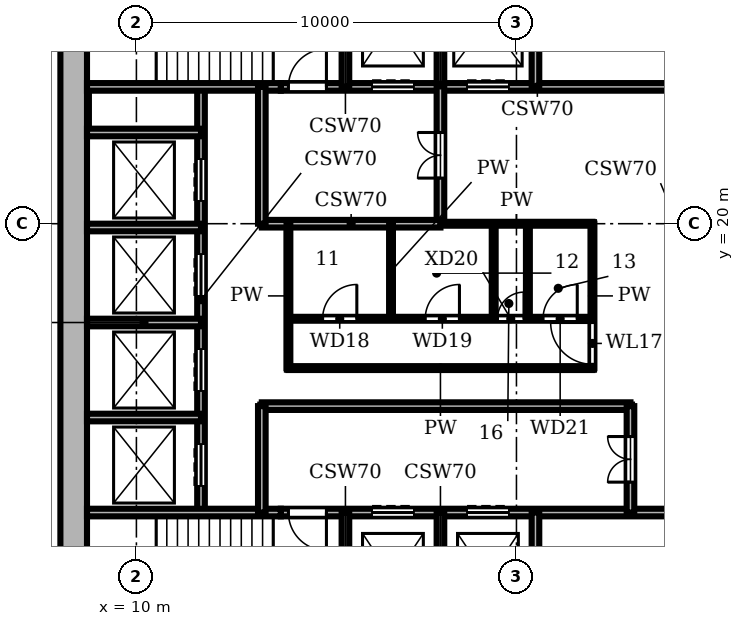
"""IFC4 building model, lengths in metres.
Left out: names, types, materials, properties, quantities, classifications, styles, units other than length and angle.
Written with IfcOpenShell. Run it as: python <this file> out.ifc"""

import sys

from ifc_helpers import new_model, si_unit, direction, frame, frame_2d, origin, place, context, subcontext, project, spatial, rectangle, extrude, element, fill, save


model = new_model("IFC4")
c1 = context("Model", 3, precision=1e-05, world=origin(), true_north=direction((0.0, 1.0)))
c2 = subcontext(c1, "Body", "Model", "MODEL_VIEW")
j1 = project(units=[si_unit("LENGTHUNIT", "METRE"), si_unit("PLANEANGLEUNIT", "RADIAN")], contexts=[c1])
p1 = place(None, origin())
s1 = spatial("IfcSite", under=j1, at=p1, CompositionType="ELEMENT")
p2 = place(p1, origin())
s2 = spatial("IfcBuilding", under=s1, at=p2, CompositionType="ELEMENT")
p3 = place(p2, frame((0.0, 0.0, 155.1)))
s3 = spatial("IfcBuildingStorey", under=s2, at=p3, CompositionType="ELEMENT", Elevation=155.1)
p4 = place(p3, frame((8.35, 27.3, 0.0), z_axis=(0.0, 0.0, 1.0), x_axis=(0.0, -1.0, 0.0)))
e1 = element("IfcWall", 1, at=p4, inside=s3, PredefinedType="SHEAR", context=c2, shape_type="SweptSolid", body=[
    extrude(rectangle(XDim=18.6, YDim=0.7, at=frame_2d((9.3, 0.0))), origin(), (0.0, 0.0, 1.0), 3.9),
])
p5 = place(p3, frame((8.7, 12.4, 0.0), z_axis=(0.0, 0.0, 1.0), x_axis=(1.0, 0.0, 0.0)))
e2 = element("IfcWall", 2, at=p5, inside=s3, PredefinedType="SHEAR", context=c2, shape_type="SweptSolid", body=[
    extrude(rectangle(XDim=5.1, YDim=0.2, at=frame_2d((2.55, 0.0))), origin(), (0.0, 0.0, 1.0), 3.58),
])
p6 = place(p3, frame((13.8, 12.4, 0.0), z_axis=(0.0, 0.0, 1.0), x_axis=(1.0, 0.0, 0.0)))
e3 = element("IfcWall", 3, at=p6, inside=s3, PredefinedType="SHEAR", context=c2, shape_type="SweptSolid", body=[
    extrude(rectangle(XDim=13.5, YDim=0.2, at=frame_2d((6.75, 0.0))), origin(), (0.0, 0.0, 1.0), 3.58),
])
p7 = place(p6, frame((2.4, 0.0, 0.0)))
e4 = element("IfcOpeningElement", 4, at=p7, cuts=e3, PredefinedType="OPENING", context=c2, shape_type="SweptSolid", body=[
    extrude(rectangle(XDim=1.1, YDim=2.1, at=frame_2d((0.55, 1.05))), frame((0.0, 0.11, 0.0), z_axis=(0.0, -1.0, 0.0), x_axis=(1.0, 0.0, 0.0)), (0.0, 0.0, 1.0), 0.22),
])
p8 = place(p6, frame((4.9, 0.0, 0.0)))
e5 = element("IfcOpeningElement", 5, at=p8, cuts=e3, PredefinedType="OPENING", context=c2, shape_type="SweptSolid", body=[
    extrude(rectangle(XDim=1.1, YDim=2.1, at=frame_2d((0.55, 1.05))), frame((0.0, 0.11, 0.0), z_axis=(0.0, -1.0, 0.0), x_axis=(1.0, 0.0, 0.0)), (0.0, 0.0, 1.0), 0.22),
])
p9 = place(p6, frame((0.2, 0.0, 0.0)))
e6 = element("IfcOpeningElement", 6, at=p9, cuts=e3, PredefinedType="OPENING", context=c2, shape_type="SweptSolid", body=[
    extrude(rectangle(XDim=1.0, YDim=2.1, at=frame_2d((0.5, 1.05))), frame((0.0, 0.11, 0.0), z_axis=(0.0, -1.0, 0.0), x_axis=(1.0, 0.0, 0.0)), (0.0, 0.0, 1.0), 0.22),
])
p10 = place(p3, frame((8.7, 14.9, 0.0), z_axis=(0.0, 0.0, 1.0), x_axis=(1.0, 0.0, 0.0)))
e7 = element("IfcWall", 7, at=p10, inside=s3, PredefinedType="SHEAR", context=c2, shape_type="SweptSolid", body=[
    extrude(rectangle(XDim=3.0, YDim=0.2, at=frame_2d((1.5, 0.0))), origin(), (0.0, 0.0, 1.0), 3.58),
])
p11 = place(p3, frame((13.3, 15.2, 0.0), z_axis=(0.0, 0.0, 1.0), x_axis=(1.0, 0.0, 0.0)))
e8 = element("IfcWall", 8, at=p11, inside=s3, PredefinedType="SHEAR", context=c2, shape_type="SweptSolid", body=[
    extrude(rectangle(XDim=9.7, YDim=0.2, at=frame_2d((4.85, 0.0))), origin(), (0.0, 0.0, 1.0), 3.58),
])
p12 = place(p3, frame((14.0, 16.2, 0.0), z_axis=(0.0, 0.0, 1.0), x_axis=(1.0, 0.0, 0.0)))
e9 = element("IfcWall", 9, at=p12, inside=s3, PredefinedType="PARTITIONING", context=c2, shape_type="SweptSolid", body=[
    extrude(rectangle(XDim=8.0, YDim=0.1, at=frame_2d((4.0, 0.0))), origin(), (0.0, 0.0, 1.0), 3.58),
])
p13 = place(p3, frame((8.7, 17.4, 0.0), z_axis=(0.0, 0.0, 1.0), x_axis=(1.0, 0.0, 0.0)))
e10 = element("IfcWall", 10, at=p13, inside=s3, PredefinedType="SHEAR", context=c2, shape_type="SweptSolid", body=[
    extrude(rectangle(XDim=3.0, YDim=0.2, at=frame_2d((1.5, 0.0))), origin(), (0.0, 0.0, 1.0), 3.58),
])
p14 = place(p3, frame((14.0, 17.5, 0.0), z_axis=(0.0, 0.0, 1.0), x_axis=(1.0, 0.0, 0.0)))
e11 = element("IfcWall", 11, at=p14, inside=s3, PredefinedType="PARTITIONING", context=c2, shape_type="SweptSolid", body=[
    extrude(rectangle(XDim=8.0, YDim=0.1, at=frame_2d((4.0, 0.0))), origin(), (0.0, 0.0, 1.0), 3.58),
])
p15 = place(p14, frame((0.9, 0.0, 0.0)))
e12 = element("IfcOpeningElement", 12, at=p15, cuts=e11, PredefinedType="OPENING", context=c2, shape_type="SweptSolid", body=[
    extrude(rectangle(XDim=0.9, YDim=2.1, at=frame_2d((0.45, 1.05))), frame((0.0, 0.06, 0.0), z_axis=(0.0, -1.0, 0.0), x_axis=(1.0, 0.0, 0.0)), (0.0, 0.0, 1.0), 0.12),
])
p16 = place(p14, frame((3.6, 0.0, 0.0)))
e13 = element("IfcOpeningElement", 13, at=p16, cuts=e11, PredefinedType="OPENING", context=c2, shape_type="SweptSolid", body=[
    extrude(rectangle(XDim=0.9, YDim=2.1, at=frame_2d((0.45, 1.05))), frame((0.0, 0.06, 0.0), z_axis=(0.0, -1.0, 0.0), x_axis=(1.0, 0.0, 0.0)), (0.0, 0.0, 1.0), 0.12),
])
p17 = place(p14, frame((5.5, 0.0, 0.0)))
e14 = element("IfcOpeningElement", 14, at=p17, cuts=e11, PredefinedType="OPENING", context=c2, shape_type="SweptSolid", body=[
    extrude(rectangle(XDim=0.7, YDim=2.1, at=frame_2d((0.35, 1.05))), frame((0.0, 0.06, 0.0), z_axis=(0.0, -1.0, 0.0), x_axis=(1.0, 0.0, 0.0)), (0.0, 0.0, 1.0), 0.12),
])
p18 = place(p14, frame((6.7, 0.0, 0.0)))
e15 = element("IfcOpeningElement", 15, at=p18, cuts=e11, PredefinedType="OPENING", context=c2, shape_type="SweptSolid", body=[
    extrude(rectangle(XDim=0.9, YDim=2.1, at=frame_2d((0.45, 1.05))), frame((0.0, 0.06, 0.0), z_axis=(0.0, -1.0, 0.0), x_axis=(1.0, 0.0, 0.0)), (0.0, 0.0, 1.0), 0.12),
])
p19 = place(p3, frame((8.7, 19.9, 0.0), z_axis=(0.0, 0.0, 1.0), x_axis=(1.0, 0.0, 0.0)))
e16 = element("IfcWall", 16, at=p19, inside=s3, PredefinedType="SHEAR", context=c2, shape_type="SweptSolid", body=[
    extrude(rectangle(XDim=3.0, YDim=0.2, at=frame_2d((1.5, 0.0))), origin(), (0.0, 0.0, 1.0), 3.58),
])
p20 = place(p3, frame((18.0, 20.0, 0.0), z_axis=(0.0, 0.0, 1.0), x_axis=(1.0, 0.0, 0.0)))
e17 = element("IfcWall", 17, at=p20, inside=s3, PredefinedType="PARTITIONING", context=c2, shape_type="SweptSolid", body=[
    extrude(rectangle(XDim=4.0, YDim=0.1, at=frame_2d((2.0, 0.0))), origin(), (0.0, 0.0, 1.0), 3.58),
])
p21 = place(p3, frame((13.3, 20.0, 0.0), z_axis=(0.0, 0.0, 1.0), x_axis=(1.0, 0.0, 0.0)))
e18 = element("IfcWall", 18, at=p21, inside=s3, PredefinedType="SHEAR", context=c2, shape_type="SweptSolid", body=[
    extrude(rectangle(XDim=4.7, YDim=0.2, at=frame_2d((2.35, 0.0))), origin(), (0.0, 0.0, 1.0), 3.58),
])
p22 = place(p3, frame((8.7, 22.4, 0.0), z_axis=(0.0, 0.0, 1.0), x_axis=(1.0, 0.0, 0.0)))
e19 = element("IfcWall", 19, at=p22, inside=s3, PredefinedType="SHEAR", context=c2, shape_type="SweptSolid", body=[
    extrude(rectangle(XDim=3.0, YDim=0.2, at=frame_2d((1.5, 0.0))), origin(), (0.0, 0.0, 1.0), 3.58),
])
p23 = place(p3, frame((8.7, 23.6, 0.0), z_axis=(0.0, 0.0, 1.0), x_axis=(1.0, 0.0, 0.0)))
e20 = element("IfcWall", 20, at=p23, inside=s3, PredefinedType="SHEAR", context=c2, shape_type="SweptSolid", body=[
    extrude(rectangle(XDim=5.1, YDim=0.2, at=frame_2d((2.55, 0.0))), origin(), (0.0, 0.0, 1.0), 3.58),
])
p24 = place(p3, frame((13.8, 23.6, 0.0), z_axis=(0.0, 0.0, 1.0), x_axis=(1.0, 0.0, 0.0)))
e21 = element("IfcWall", 21, at=p24, inside=s3, PredefinedType="SHEAR", context=c2, shape_type="SweptSolid", body=[
    extrude(rectangle(XDim=13.5, YDim=0.2, at=frame_2d((6.75, 0.0))), origin(), (0.0, 0.0, 1.0), 3.58),
])
p25 = place(p24, frame((2.4, 0.0, 0.0)))
e22 = element("IfcOpeningElement", 22, at=p25, cuts=e21, PredefinedType="OPENING", context=c2, shape_type="SweptSolid", body=[
    extrude(rectangle(XDim=1.1, YDim=2.1, at=frame_2d((0.55, 1.05))), frame((0.0, 0.11, 0.0), z_axis=(0.0, -1.0, 0.0), x_axis=(1.0, 0.0, 0.0)), (0.0, 0.0, 1.0), 0.22),
])
p26 = place(p24, frame((4.9, 0.0, 0.0)))
e23 = element("IfcOpeningElement", 23, at=p26, cuts=e21, PredefinedType="OPENING", context=c2, shape_type="SweptSolid", body=[
    extrude(rectangle(XDim=1.1, YDim=2.1, at=frame_2d((0.55, 1.05))), frame((0.0, 0.11, 0.0), z_axis=(0.0, -1.0, 0.0), x_axis=(1.0, 0.0, 0.0)), (0.0, 0.0, 1.0), 0.22),
])
p27 = place(p24, frame((0.2, 0.0, 0.0)))
e24 = element("IfcOpeningElement", 24, at=p27, cuts=e21, PredefinedType="OPENING", context=c2, shape_type="SweptSolid", body=[
    extrude(rectangle(XDim=1.0, YDim=2.1, at=frame_2d((0.5, 1.05))), frame((0.0, 0.11, 0.0), z_axis=(0.0, -1.0, 0.0), x_axis=(1.0, 0.0, 0.0)), (0.0, 0.0, 1.0), 0.22),
])
p28 = place(p3, frame((11.7, 12.4, 0.0), z_axis=(0.0, 0.0, 1.0), x_axis=(0.0, 1.0, 0.0)))
e25 = element("IfcWall", 25, at=p28, inside=s3, PredefinedType="SHEAR", context=c2, shape_type="SweptSolid", body=[
    extrude(rectangle(XDim=11.2, YDim=0.2, at=frame_2d((5.6, 0.0))), origin(), (0.0, 0.0, 1.0), 3.58),
])
p29 = place(p28, frame((0.7, 0.0, 0.0)))
e26 = element("IfcOpeningElement", 26, at=p29, cuts=e25, PredefinedType="OPENING", context=c2, shape_type="SweptSolid", body=[
    extrude(rectangle(XDim=1.1, YDim=2.1, at=frame_2d((0.55, 1.05))), frame((0.0, 0.11, 0.0), z_axis=(0.0, -1.0, 0.0), x_axis=(1.0, 0.0, 0.0)), (0.0, 0.0, 1.0), 0.22),
])
p30 = place(p28, frame((3.2, 0.0, 0.0)))
e27 = element("IfcOpeningElement", 27, at=p30, cuts=e25, PredefinedType="OPENING", context=c2, shape_type="SweptSolid", body=[
    extrude(rectangle(XDim=1.1, YDim=2.1, at=frame_2d((0.55, 1.05))), frame((0.0, 0.11, 0.0), z_axis=(0.0, -1.0, 0.0), x_axis=(1.0, 0.0, 0.0)), (0.0, 0.0, 1.0), 0.22),
])
p31 = place(p28, frame((5.7, 0.0, 0.0)))
e28 = element("IfcOpeningElement", 28, at=p31, cuts=e25, PredefinedType="OPENING", context=c2, shape_type="SweptSolid", body=[
    extrude(rectangle(XDim=1.1, YDim=2.1, at=frame_2d((0.55, 1.05))), frame((0.0, 0.11, 0.0), z_axis=(0.0, -1.0, 0.0), x_axis=(1.0, 0.0, 0.0)), (0.0, 0.0, 1.0), 0.22),
])
p32 = place(p28, frame((8.2, 0.0, 0.0)))
e29 = element("IfcOpeningElement", 29, at=p32, cuts=e25, PredefinedType="OPENING", context=c2, shape_type="SweptSolid", body=[
    extrude(rectangle(XDim=1.1, YDim=2.1, at=frame_2d((0.55, 1.05))), frame((0.0, 0.11, 0.0), z_axis=(0.0, -1.0, 0.0), x_axis=(1.0, 0.0, 0.0)), (0.0, 0.0, 1.0), 0.22),
])
p33 = place(p3, frame((13.3, 12.4, 0.0), z_axis=(0.0, 0.0, 1.0), x_axis=(0.0, 1.0, 0.0)))
e30 = element("IfcWall", 30, at=p33, inside=s3, PredefinedType="SHEAR", context=c2, shape_type="SweptSolid", body=[
    extrude(rectangle(XDim=2.8, YDim=0.2, at=frame_2d((1.4, 0.0))), origin(), (0.0, 0.0, 1.0), 3.58),
])
p34 = place(p3, frame((13.3, 20.0, 0.0), z_axis=(0.0, 0.0, 1.0), x_axis=(0.0, 1.0, 0.0)))
e31 = element("IfcWall", 31, at=p34, inside=s3, PredefinedType="SHEAR", context=c2, shape_type="SweptSolid", body=[
    extrude(rectangle(XDim=3.6, YDim=0.2, at=frame_2d((1.8, 0.0))), origin(), (0.0, 0.0, 1.0), 3.58),
])
p35 = place(p3, frame((14.0, 16.2, 0.0), z_axis=(0.0, 0.0, 1.0), x_axis=(0.0, 1.0, 0.0)))
e32 = element("IfcWall", 32, at=p35, inside=s3, PredefinedType="PARTITIONING", context=c2, shape_type="SweptSolid", body=[
    extrude(rectangle(XDim=3.8, YDim=0.1, at=frame_2d((1.9, 0.0))), origin(), (0.0, 0.0, 1.0), 3.58),
])
for number, where, z_axis, x_axis in (
    (33, (15.5, 8.7, 0.0), (0.0, 0.0, 1.0), (0.0, 1.0, 0.0)),
    (34, (15.5, 23.6, 0.0), (0.0, 0.0, 1.0), (0.0, 1.0, 0.0)),
):
    element("IfcWall", number, at=place(p3, frame(where, z_axis=z_axis, x_axis=x_axis)), inside=s3, PredefinedType="SHEAR", context=c2, shape_type="SweptSolid", body=[
        extrude(rectangle(XDim=3.7, YDim=0.2, at=frame_2d((1.85, 0.0))), origin(), (0.0, 0.0, 1.0), 3.58),
    ])
p36 = place(p3, frame((16.7, 17.5, 0.0), z_axis=(0.0, 0.0, 1.0), x_axis=(0.0, 1.0, 0.0)))
e35 = element("IfcWall", 35, at=p36, inside=s3, PredefinedType="PARTITIONING", context=c2, shape_type="SweptSolid", body=[
    extrude(rectangle(XDim=2.5, YDim=0.1, at=frame_2d((1.25, 0.0))), origin(), (0.0, 0.0, 1.0), 3.58),
])
p37 = place(p3, frame((18.0, 8.7, 0.0), z_axis=(0.0, 0.0, 1.0), x_axis=(0.0, 1.0, 0.0)))
e36 = element("IfcWall", 36, at=p37, inside=s3, PredefinedType="SHEAR", context=c2, shape_type="SweptSolid", body=[
    extrude(rectangle(XDim=3.7, YDim=0.2, at=frame_2d((1.85, 0.0))), origin(), (0.0, 0.0, 1.0), 3.58),
])
p38 = place(p3, frame((18.0, 20.0, 0.0), z_axis=(0.0, 0.0, 1.0), x_axis=(0.0, 1.0, 0.0)))
e37 = element("IfcWall", 37, at=p38, inside=s3, PredefinedType="SHEAR", context=c2, shape_type="SweptSolid", body=[
    extrude(rectangle(XDim=7.3, YDim=0.2, at=frame_2d((3.65, 0.0))), origin(), (0.0, 0.0, 1.0), 3.58),
])
p39 = place(p38, frame((1.2, 0.0, 0.0)))
e38 = element("IfcOpeningElement", 38, at=p39, cuts=e37, PredefinedType="OPENING", context=c2, shape_type="SweptSolid", body=[
    extrude(rectangle(XDim=1.2, YDim=2.1, at=frame_2d((0.6, 1.05))), frame((0.0, 0.11, 0.0), z_axis=(0.0, -1.0, 0.0), x_axis=(1.0, 0.0, 0.0)), (0.0, 0.0, 1.0), 0.22),
])
for number, where, z_axis, x_axis in (
    (39, (19.4, 17.5, 0.0), (0.0, 0.0, 1.0), (0.0, 1.0, 0.0)),
    (40, (20.3, 17.5, 0.0), (0.0, 0.0, 1.0), (0.0, 1.0, 0.0)),
):
    element("IfcWall", number, at=place(p3, frame(where, z_axis=z_axis, x_axis=x_axis)), inside=s3, PredefinedType="PARTITIONING", context=c2, shape_type="SweptSolid", body=[
        extrude(rectangle(XDim=2.5, YDim=0.1, at=frame_2d((1.25, 0.0))), origin(), (0.0, 0.0, 1.0), 3.58),
    ])
for number, where, z_axis, x_axis in (
    (41, (20.5, 8.7, 0.0), (0.0, 0.0, 1.0), (0.0, 1.0, 0.0)),
    (42, (20.5, 23.6, 0.0), (0.0, 0.0, 1.0), (0.0, 1.0, 0.0)),
):
    element("IfcWall", number, at=place(p3, frame(where, z_axis=z_axis, x_axis=x_axis)), inside=s3, PredefinedType="SHEAR", context=c2, shape_type="SweptSolid", body=[
        extrude(rectangle(XDim=3.7, YDim=0.2, at=frame_2d((1.85, 0.0))), origin(), (0.0, 0.0, 1.0), 3.58),
    ])
p40 = place(p3, frame((22.0, 16.2, 0.0), z_axis=(0.0, 0.0, 1.0), x_axis=(0.0, 1.0, 0.0)))
e43 = element("IfcWall", 43, at=p40, inside=s3, PredefinedType="PARTITIONING", context=c2, shape_type="SweptSolid", body=[
    extrude(rectangle(XDim=3.8, YDim=0.1, at=frame_2d((1.9, 0.0))), origin(), (0.0, 0.0, 1.0), 3.58),
])
p41 = place(p40, frame((0.1, 0.0, 0.0)))
e44 = element("IfcOpeningElement", 44, at=p41, cuts=e43, PredefinedType="OPENING", context=c2, shape_type="SweptSolid", body=[
    extrude(rectangle(XDim=1.1, YDim=2.1, at=frame_2d((0.55, 1.05))), frame((0.0, 0.06, 0.0), z_axis=(0.0, -1.0, 0.0), x_axis=(1.0, 0.0, 0.0)), (0.0, 0.0, 1.0), 0.12),
])
p42 = place(p3, frame((23.0, 12.4, 0.0), z_axis=(0.0, 0.0, 1.0), x_axis=(0.0, 1.0, 0.0)))
e45 = element("IfcWall", 45, at=p42, inside=s3, PredefinedType="SHEAR", context=c2, shape_type="SweptSolid", body=[
    extrude(rectangle(XDim=2.8, YDim=0.2, at=frame_2d((1.4, 0.0))), origin(), (0.0, 0.0, 1.0), 3.58),
])
p43 = place(p42, frame((0.8, 0.0, 0.0)))
e46 = element("IfcOpeningElement", 46, at=p43, cuts=e45, PredefinedType="OPENING", context=c2, shape_type="SweptSolid", body=[
    extrude(rectangle(XDim=1.2, YDim=2.1, at=frame_2d((0.6, 1.05))), frame((0.0, 0.11, 0.0), z_axis=(0.0, -1.0, 0.0), x_axis=(1.0, 0.0, 0.0)), (0.0, 0.0, 1.0), 0.22),
])
p44 = place(p29, origin())
e47 = element("IfcDoor", 47, at=p44, inside=s3, OperationType="DOUBLE_DOOR_SLIDING", PredefinedType="DOOR", context=c2, shape_type="SweptSolid", body=[
    extrude(rectangle(XDim=1.1, YDim=2.1, at=frame_2d((0.55, 1.05))), frame((0.0, 0.025, 0.0), z_axis=(0.0, -1.0, 0.0), x_axis=(1.0, 0.0, 0.0)), (0.0, 0.0, 1.0), 0.05),
])
fill(e26, e47)
p45 = place(p30, origin())
e48 = element("IfcDoor", 48, at=p45, inside=s3, OperationType="DOUBLE_DOOR_SLIDING", PredefinedType="DOOR", context=c2, shape_type="SweptSolid", body=[
    extrude(rectangle(XDim=1.1, YDim=2.1, at=frame_2d((0.55, 1.05))), frame((0.0, 0.025, 0.0), z_axis=(0.0, -1.0, 0.0), x_axis=(1.0, 0.0, 0.0)), (0.0, 0.0, 1.0), 0.05),
])
fill(e27, e48)
p46 = place(p31, origin())
e49 = element("IfcDoor", 49, at=p46, inside=s3, OperationType="DOUBLE_DOOR_SLIDING", PredefinedType="DOOR", context=c2, shape_type="SweptSolid", body=[
    extrude(rectangle(XDim=1.1, YDim=2.1, at=frame_2d((0.55, 1.05))), frame((0.0, 0.025, 0.0), z_axis=(0.0, -1.0, 0.0), x_axis=(1.0, 0.0, 0.0)), (0.0, 0.0, 1.0), 0.05),
])
fill(e28, e49)
p47 = place(p32, origin())
e50 = element("IfcDoor", 50, at=p47, inside=s3, OperationType="DOUBLE_DOOR_SLIDING", PredefinedType="DOOR", context=c2, shape_type="SweptSolid", body=[
    extrude(rectangle(XDim=1.1, YDim=2.1, at=frame_2d((0.55, 1.05))), frame((0.0, 0.025, 0.0), z_axis=(0.0, -1.0, 0.0), x_axis=(1.0, 0.0, 0.0)), (0.0, 0.0, 1.0), 0.05),
])
fill(e29, e50)
p48 = place(p7, origin())
e51 = element("IfcDoor", 51, at=p48, inside=s3, OperationType="DOUBLE_DOOR_SLIDING", PredefinedType="DOOR", context=c2, shape_type="SweptSolid", body=[
    extrude(rectangle(XDim=1.1, YDim=2.1, at=frame_2d((0.55, 1.05))), frame((0.0, 0.025, 0.0), z_axis=(0.0, -1.0, 0.0), x_axis=(1.0, 0.0, 0.0)), (0.0, 0.0, 1.0), 0.05),
])
fill(e4, e51)
p49 = place(p8, origin())
e52 = element("IfcDoor", 52, at=p49, inside=s3, OperationType="DOUBLE_DOOR_SLIDING", PredefinedType="DOOR", context=c2, shape_type="SweptSolid", body=[
    extrude(rectangle(XDim=1.1, YDim=2.1, at=frame_2d((0.55, 1.05))), frame((0.0, 0.025, 0.0), z_axis=(0.0, -1.0, 0.0), x_axis=(1.0, 0.0, 0.0)), (0.0, 0.0, 1.0), 0.05),
])
fill(e5, e52)
p50 = place(p25, origin())
e53 = element("IfcDoor", 53, at=p50, inside=s3, OperationType="DOUBLE_DOOR_SLIDING", PredefinedType="DOOR", context=c2, shape_type="SweptSolid", body=[
    extrude(rectangle(XDim=1.1, YDim=2.1, at=frame_2d((0.55, 1.05))), frame((0.0, 0.025, 0.0), z_axis=(0.0, -1.0, 0.0), x_axis=(1.0, 0.0, 0.0)), (0.0, 0.0, 1.0), 0.05),
])
fill(e22, e53)
p51 = place(p26, origin())
e54 = element("IfcDoor", 54, at=p51, inside=s3, OperationType="DOUBLE_DOOR_SLIDING", PredefinedType="DOOR", context=c2, shape_type="SweptSolid", body=[
    extrude(rectangle(XDim=1.1, YDim=2.1, at=frame_2d((0.55, 1.05))), frame((0.0, 0.025, 0.0), z_axis=(0.0, -1.0, 0.0), x_axis=(1.0, 0.0, 0.0)), (0.0, 0.0, 1.0), 0.05),
])
fill(e23, e54)
p52 = place(p9, frame((1.0, 0.0, 0.0), z_axis=(0.0, 0.0, 1.0), x_axis=(-1.0, 0.0, 0.0)))
e55 = element("IfcDoor", 55, at=p52, inside=s3, OperationType="SINGLE_SWING_LEFT", PredefinedType="DOOR", context=c2, shape_type="SweptSolid", body=[
    extrude(rectangle(XDim=1.0, YDim=2.1, at=frame_2d((0.5, 1.05))), frame((0.0, 0.025, 0.0), z_axis=(0.0, -1.0, 0.0), x_axis=(1.0, 0.0, 0.0)), (0.0, 0.0, 1.0), 0.05),
])
fill(e6, e55)
p53 = place(p27, origin())
e56 = element("IfcDoor", 56, at=p53, inside=s3, OperationType="SINGLE_SWING_RIGHT", PredefinedType="DOOR", context=c2, shape_type="SweptSolid", body=[
    extrude(rectangle(XDim=1.0, YDim=2.1, at=frame_2d((0.5, 1.05))), frame((0.0, 0.025, 0.0), z_axis=(0.0, -1.0, 0.0), x_axis=(1.0, 0.0, 0.0)), (0.0, 0.0, 1.0), 0.05),
])
fill(e24, e56)
p54 = place(p43, origin())
e57 = element("IfcDoor", 57, at=p54, inside=s3, OperationType="DOUBLE_DOOR_SINGLE_SWING", PredefinedType="DOOR", context=c2, shape_type="SweptSolid", body=[
    extrude(rectangle(XDim=1.2, YDim=2.1, at=frame_2d((0.6, 1.05))), frame((0.0, 0.025, 0.0), z_axis=(0.0, -1.0, 0.0), x_axis=(1.0, 0.0, 0.0)), (0.0, 0.0, 1.0), 0.05),
])
fill(e46, e57)
p55 = place(p39, origin())
e58 = element("IfcDoor", 58, at=p55, inside=s3, OperationType="DOUBLE_DOOR_SINGLE_SWING", PredefinedType="DOOR", context=c2, shape_type="SweptSolid", body=[
    extrude(rectangle(XDim=1.2, YDim=2.1, at=frame_2d((0.6, 1.05))), frame((0.0, 0.025, 0.0), z_axis=(0.0, -1.0, 0.0), x_axis=(1.0, 0.0, 0.0)), (0.0, 0.0, 1.0), 0.05),
])
fill(e38, e58)
p56 = place(p41, origin())
e59 = element("IfcDoor", 59, at=p56, inside=s3, OperationType="SINGLE_SWING_RIGHT", PredefinedType="DOOR", context=c2, shape_type="SweptSolid", body=[
    extrude(rectangle(XDim=1.1, YDim=2.1, at=frame_2d((0.55, 1.05))), frame((0.0, 0.025, 0.0), z_axis=(0.0, -1.0, 0.0), x_axis=(1.0, 0.0, 0.0)), (0.0, 0.0, 1.0), 0.05),
])
fill(e44, e59)
p57 = place(p15, origin())
e60 = element("IfcDoor", 60, at=p57, inside=s3, OperationType="SINGLE_SWING_RIGHT", PredefinedType="DOOR", context=c2, shape_type="SweptSolid", body=[
    extrude(rectangle(XDim=0.9, YDim=2.1, at=frame_2d((0.45, 1.05))), frame((0.0, 0.025, 0.0), z_axis=(0.0, -1.0, 0.0), x_axis=(1.0, 0.0, 0.0)), (0.0, 0.0, 1.0), 0.05),
])
fill(e12, e60)
p58 = place(p16, origin())
e61 = element("IfcDoor", 61, at=p58, inside=s3, OperationType="SINGLE_SWING_RIGHT", PredefinedType="DOOR", context=c2, shape_type="SweptSolid", body=[
    extrude(rectangle(XDim=0.9, YDim=2.1, at=frame_2d((0.45, 1.05))), frame((0.0, 0.025, 0.0), z_axis=(0.0, -1.0, 0.0), x_axis=(1.0, 0.0, 0.0)), (0.0, 0.0, 1.0), 0.05),
])
fill(e13, e61)
p59 = place(p17, origin())
e62 = element("IfcDoor", 62, at=p59, inside=s3, OperationType="SINGLE_SWING_RIGHT", PredefinedType="DOOR", context=c2, shape_type="SweptSolid", body=[
    extrude(rectangle(XDim=0.7, YDim=2.1, at=frame_2d((0.35, 1.05))), frame((0.0, 0.025, 0.0), z_axis=(0.0, -1.0, 0.0), x_axis=(1.0, 0.0, 0.0)), (0.0, 0.0, 1.0), 0.05),
])
fill(e14, e62)
p60 = place(p18, origin())
e63 = element("IfcDoor", 63, at=p60, inside=s3, OperationType="SINGLE_SWING_RIGHT", PredefinedType="DOOR", context=c2, shape_type="SweptSolid", body=[
    extrude(rectangle(XDim=0.9, YDim=2.1, at=frame_2d((0.45, 1.05))), frame((0.0, 0.025, 0.0), z_axis=(0.0, -1.0, 0.0), x_axis=(1.0, 0.0, 0.0)), (0.0, 0.0, 1.0), 0.05),
])
fill(e15, e63)
save(model, sys.argv[1])
